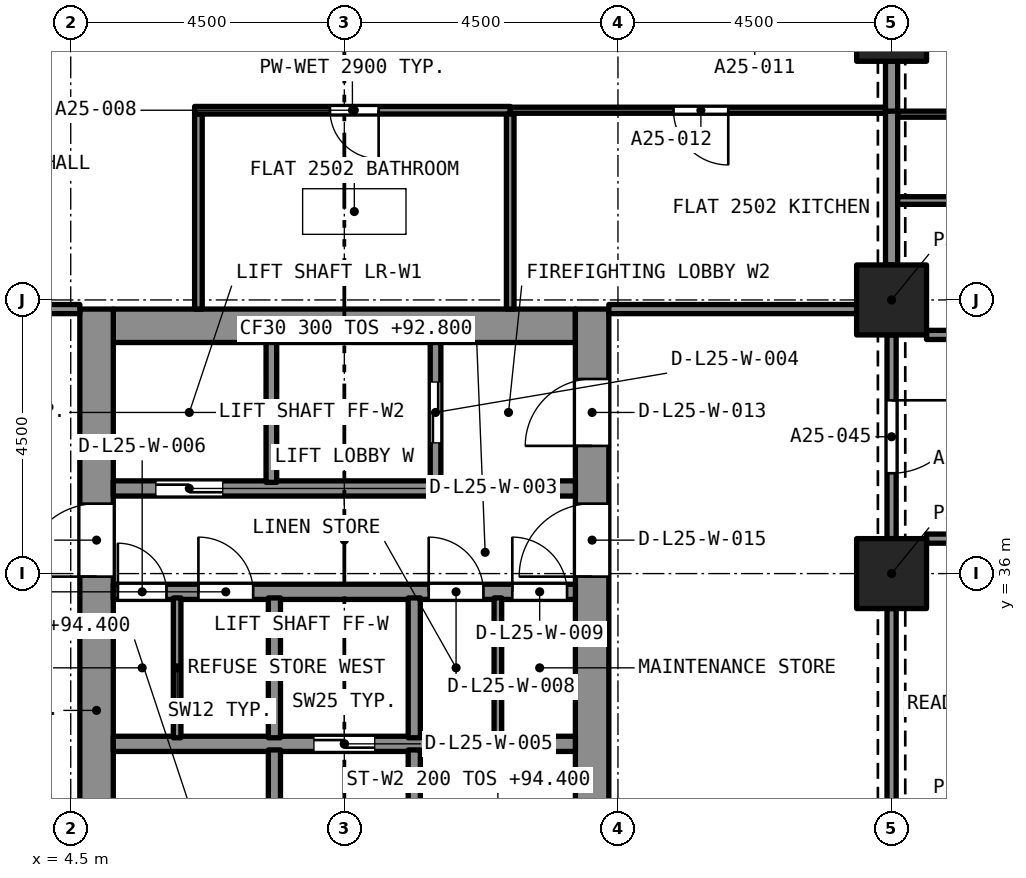
"""IFC4 building model, lengths in metres.
Left out: names, types, materials, properties, quantities, classifications, styles, units other than length and angle.
Written with IfcOpenShell. Run it as: python <this file> out.ifc"""

import sys

from ifc_helpers import new_model, si_unit, direction, frame, frame_2d, origin, origin_2d, place, context, subcontext, project, spatial, rectangle, extrude, element, fill, save


model = new_model("IFC4")
c1 = context("Model", 3, precision=1e-05, world=origin(), true_north=direction((0.0, 1.0)))
c2 = subcontext(c1, "Body", "Model", "MODEL_VIEW")
j1 = project(units=[si_unit("LENGTHUNIT", "METRE"), si_unit("PLANEANGLEUNIT", "RADIAN")], contexts=[c1])
p1 = place(None, origin())
s1 = spatial("IfcSite", under=j1, at=p1, CompositionType="ELEMENT")
p2 = place(p1, origin())
s2 = spatial("IfcBuilding", under=s1, at=p2, CompositionType="ELEMENT")
p3 = place(p2, frame((0.0, 0.0, 92.8)))
s3 = spatial("IfcBuildingStorey", under=s2, at=p3, CompositionType="ELEMENT", Elevation=92.8)
for number, where, z_axis, x_axis in (
    (1, (18.0, 36.0, 0.0), (0.0, 0.0, 1.0), (1.0, 0.0, 0.0)),
    (2, (18.0, 40.5, 0.0), (0.0, 0.0, 1.0), (1.0, 0.0, 0.0)),
    (3, (18.0, 45.0, 0.0), (0.0, 0.0, 1.0), (1.0, 0.0, 0.0)),
):
    element("IfcColumn", number, at=place(p3, frame(where, z_axis=z_axis, x_axis=x_axis)), inside=s3, PredefinedType="COLUMN", context=c2, shape_type="SweptSolid", body=[
        extrude(rectangle(XDim=1.15, YDim=1.15, at=origin_2d()), origin(), (0.0, 0.0, 1.0), 3.2),
    ])
p4 = place(p3, frame((5.2, 40.075, 0.0), z_axis=(0.0, 0.0, 1.0), x_axis=(1.0, 0.0, 0.0)))
e4 = element("IfcWall", 4, at=p4, inside=s3, PredefinedType="SOLIDWALL", context=c2, shape_type="SweptSolid", body=[
    extrude(rectangle(XDim=7.6, YDim=0.55, at=frame_2d((3.8, 0.0))), origin(), (0.0, 0.0, 1.0), 3.2),
])
p5 = place(p3, frame((4.925, 27.15, 0.0), z_axis=(0.0, 0.0, 1.0), x_axis=(0.0, 1.0, 0.0)))
e5 = element("IfcWall", 5, at=p5, inside=s3, PredefinedType="SOLIDWALL", context=c2, shape_type="SweptSolid", body=[
    extrude(rectangle(XDim=13.2, YDim=0.55, at=frame_2d((6.6, 0.0))), origin(), (0.0, 0.0, 1.0), 3.2),
])
p6 = place(p5, frame((8.8, 0.0, 0.0)))
e6 = element("IfcOpeningElement", 6, at=p6, cuts=e5, PredefinedType="OPENING", context=c2, shape_type="SweptSolid", body=[
    extrude(rectangle(XDim=1.2, YDim=2.1, at=frame_2d((0.6, 1.05))), frame((0.0, 0.285, 0.0), z_axis=(0.0, -1.0, 0.0), x_axis=(1.0, 0.0, 0.0)), (0.0, 0.0, 1.0), 0.57),
])
p7 = place(p3, frame((13.075, 27.15, 0.0), z_axis=(0.0, 0.0, 1.0), x_axis=(0.0, 1.0, 0.0)))
e7 = element("IfcWall", 7, at=p7, inside=s3, PredefinedType="SOLIDWALL", context=c2, shape_type="SweptSolid", body=[
    extrude(rectangle(XDim=13.2, YDim=0.55, at=frame_2d((6.6, 0.0))), origin(), (0.0, 0.0, 1.0), 3.2),
])
p8 = place(p7, frame((10.95, 0.0, 0.0)))
e8 = element("IfcOpeningElement", 8, at=p8, cuts=e7, PredefinedType="OPENING", context=c2, shape_type="SweptSolid", body=[
    extrude(rectangle(XDim=1.1, YDim=2.1, at=frame_2d((0.55, 1.05))), frame((0.0, 0.285, 0.0), z_axis=(0.0, -1.0, 0.0), x_axis=(1.0, 0.0, 0.0)), (0.0, 0.0, 1.0), 0.57),
])
p9 = place(p7, frame((8.8, 0.0, 0.0)))
e9 = element("IfcOpeningElement", 9, at=p9, cuts=e7, PredefinedType="OPENING", context=c2, shape_type="SweptSolid", body=[
    extrude(rectangle(XDim=1.2, YDim=2.1, at=frame_2d((0.6, 1.05))), frame((0.0, 0.285, 0.0), z_axis=(0.0, -1.0, 0.0), x_axis=(1.0, 0.0, 0.0)), (0.0, 0.0, 1.0), 0.57),
])
p10 = place(p3, frame((6.6, 40.35, 0.0), z_axis=(0.0, 0.0, 1.0), x_axis=(0.0, 1.0, 0.0)))
e10 = element("IfcWall", 10, at=p10, inside=s3, PredefinedType="PARTITIONING", context=c2, shape_type="SweptSolid", body=[
    extrude(rectangle(XDim=3.208, YDim=0.125, at=frame_2d((1.604, 0.0))), origin(), (0.0, 0.0, 1.0), 2.9),
])
p11 = place(p3, frame((11.728, 43.62, 0.0), z_axis=(0.0, 0.0, 1.0), x_axis=(-1.0, 0.0, 0.0)))
e11 = element("IfcWall", 11, at=p11, inside=s3, PredefinedType="PARTITIONING", context=c2, shape_type="SweptSolid", body=[
    extrude(rectangle(XDim=5.19, YDim=0.125, at=frame_2d((2.595, 0.0))), origin(), (0.0, 0.0, 1.0), 2.9),
])
p12 = place(p11, frame((2.164, 0.0, 0.0)))
e12 = element("IfcOpeningElement", 12, at=p12, cuts=e11, PredefinedType="OPENING", context=c2, shape_type="SweptSolid", body=[
    extrude(rectangle(XDim=0.8, YDim=2.1, at=frame_2d((0.4, 1.05))), frame((0.0, 0.073, 0.0), z_axis=(0.0, -1.0, 0.0), x_axis=(1.0, 0.0, 0.0)), (0.0, 0.0, 1.0), 0.145),
])
p13 = place(p3, frame((11.728, 40.35, 0.0), z_axis=(0.0, 0.0, 1.0), x_axis=(0.0, 1.0, 0.0)))
e13 = element("IfcWall", 13, at=p13, inside=s3, PredefinedType="PARTITIONING", context=c2, shape_type="SweptSolid", body=[
    extrude(rectangle(XDim=3.208, YDim=0.125, at=frame_2d((1.604, 0.0))), origin(), (0.0, 0.0, 1.0), 2.9),
])
p14 = place(p3, frame((17.9, 43.62, 0.0), z_axis=(0.0, 0.0, 1.0), x_axis=(-1.0, 0.0, 0.0)))
e14 = element("IfcWall", 14, at=p14, inside=s3, PredefinedType="PARTITIONING", context=c2, shape_type="SweptSolid", body=[
    extrude(rectangle(XDim=6.172, YDim=0.1, at=frame_2d((3.086, 0.0))), origin(), (0.0, 0.0, 1.0), 2.9),
])
p15 = place(p14, frame((2.586, 0.0, 0.0)))
e15 = element("IfcOpeningElement", 15, at=p15, cuts=e14, PredefinedType="OPENING", context=c2, shape_type="SweptSolid", body=[
    extrude(rectangle(XDim=0.9, YDim=2.1, at=frame_2d((0.45, 1.05))), frame((0.0, 0.06, 0.0), z_axis=(0.0, -1.0, 0.0), x_axis=(1.0, 0.0, 0.0)), (0.0, 0.0, 1.0), 0.12),
])
p16 = place(p3, frame((18.0, 43.57, 0.0), z_axis=(0.0, 0.0, 1.0), x_axis=(0.0, 1.0, 0.0)))
e16 = element("IfcWall", 16, at=p16, inside=s3, PredefinedType="PARTITIONING", context=c2, shape_type="SweptSolid", body=[
    extrude(rectangle(XDim=0.855, YDim=0.2, at=frame_2d((0.427, 0.0))), origin(), (0.0, 0.0, 1.0), 2.38),
])
p17 = place(p3, frame((0.575, 40.35, 0.0), z_axis=(0.0, 0.0, 1.0), x_axis=(1.0, 0.0, 0.0)))
e17 = element("IfcWall", 17, at=p17, inside=s3, PredefinedType="PARTITIONING", context=c2, shape_type="SweptSolid", body=[
    extrude(rectangle(XDim=4.075, YDim=0.15, at=frame_2d((2.038, 0.0))), origin(), (0.0, 0.0, 1.0), 2.9),
])
p18 = place(p17, frame((1.175, 0.0, 0.0)))
e18 = element("IfcOpeningElement", 18, at=p18, cuts=e17, PredefinedType="OPENING", context=c2, shape_type="SweptSolid", body=[
    extrude(rectangle(XDim=1.0, YDim=2.1, at=frame_2d((0.5, 1.05))), frame((0.0, 0.085, 0.0), z_axis=(0.0, -1.0, 0.0), x_axis=(1.0, 0.0, 0.0)), (0.0, 0.0, 1.0), 0.17),
])
p19 = place(p3, frame((18.0, 41.075, 0.0), z_axis=(0.0, 0.0, 1.0), x_axis=(0.0, 1.0, 0.0)))
e19 = element("IfcWall", 19, at=p19, inside=s3, PredefinedType="PARTITIONING", context=c2, shape_type="SweptSolid", body=[
    extrude(rectangle(XDim=2.53, YDim=0.2, at=frame_2d((1.265, 0.0))), origin(), (0.0, 0.0, 1.0), 2.38),
])
p20 = place(p3, frame((13.35, 40.35, 0.0), z_axis=(0.0, 0.0, 1.0), x_axis=(1.0, 0.0, 0.0)))
e20 = element("IfcWall", 20, at=p20, inside=s3, PredefinedType="PARTITIONING", context=c2, shape_type="SweptSolid", body=[
    extrude(rectangle(XDim=4.075, YDim=0.15, at=frame_2d((2.038, 0.0))), origin(), (0.0, 0.0, 1.0), 2.9),
])
p21 = place(p3, frame((20.762, 42.135, 0.0), z_axis=(0.0, 0.0, 1.0), x_axis=(-1.0, 0.0, 0.0)))
e21 = element("IfcWall", 21, at=p21, inside=s3, PredefinedType="PARTITIONING", context=c2, shape_type="SweptSolid", body=[
    extrude(rectangle(XDim=2.662, YDim=0.125, at=frame_2d((1.331, 0.0))), origin(), (0.0, 0.0, 1.0), 2.75),
])
p22 = place(p21, frame((1.012, 0.0, 0.0)))
e22 = element("IfcOpeningElement", 22, at=p22, cuts=e21, PredefinedType="OPENING", context=c2, shape_type="SweptSolid", body=[
    extrude(rectangle(XDim=0.8, YDim=2.1, at=frame_2d((0.4, 1.05))), frame((0.0, 0.073, 0.0), z_axis=(0.0, -1.0, 0.0), x_axis=(1.0, 0.0, 0.0)), (0.0, 0.0, 1.0), 0.145),
])
p23 = place(p3, frame((18.575, 39.925, 0.0), z_axis=(0.0, 0.0, 1.0), x_axis=(1.0, 0.0, 0.0)))
e23 = element("IfcWall", 23, at=p23, inside=s3, PredefinedType="PARTITIONING", context=c2, shape_type="SweptSolid", body=[
    extrude(rectangle(XDim=2.125, YDim=0.15, at=frame_2d((1.062, 0.0))), origin(), (0.0, 0.0, 1.0), 2.75),
])
p24 = place(p3, frame((18.1, 43.555, 0.0), z_axis=(0.0, 0.0, 1.0), x_axis=(1.0, 0.0, 0.0)))
e24 = element("IfcWall", 24, at=p24, inside=s3, PredefinedType="PARTITIONING", context=c2, shape_type="SweptSolid", body=[
    extrude(rectangle(XDim=4.4, YDim=0.1, at=frame_2d((2.2, 0.0))), origin(), (0.0, 0.0, 1.0), 2.75),
])
p25 = place(p24, frame((1.65, 0.0, 0.0)))
e25 = element("IfcOpeningElement", 25, at=p25, cuts=e24, PredefinedType="OPENING", context=c2, shape_type="SweptSolid", body=[
    extrude(rectangle(XDim=1.0, YDim=2.1, at=frame_2d((0.5, 1.05))), frame((0.0, 0.06, 0.0), z_axis=(0.0, -1.0, 0.0), x_axis=(1.0, 0.0, 0.0)), (0.0, 0.0, 1.0), 0.12),
])
p26 = place(p3, frame((22.5, 36.575, 0.0), z_axis=(0.0, 0.0, 1.0), x_axis=(-1.0, 0.0, 0.0)))
e26 = element("IfcWall", 26, at=p26, inside=s3, PredefinedType="PARTITIONING", context=c2, shape_type="SweptSolid", body=[
    extrude(rectangle(XDim=3.925, YDim=0.15, at=frame_2d((1.962, 0.0))), origin(), (0.0, 0.0, 1.0), 2.75),
])
p27 = place(p26, frame((1.75, 0.0, 0.0)))
e27 = element("IfcOpeningElement", 27, at=p27, cuts=e26, PredefinedType="OPENING", context=c2, shape_type="SweptSolid", body=[
    extrude(rectangle(XDim=1.0, YDim=2.1, at=frame_2d((0.5, 1.05))), frame((0.0, 0.085, 0.0), z_axis=(0.0, -1.0, 0.0), x_axis=(1.0, 0.0, 0.0)), (0.0, 0.0, 1.0), 0.17),
])
p28 = place(p3, frame((18.0, 39.925, 0.0), z_axis=(0.0, 0.0, 1.0), x_axis=(0.0, -1.0, 0.0)))
e28 = element("IfcWall", 28, at=p28, inside=s3, PredefinedType="PARTITIONING", context=c2, shape_type="SweptSolid", body=[
    extrude(rectangle(XDim=3.35, YDim=0.15, at=frame_2d((1.675, 0.0))), origin(), (0.0, 0.0, 1.0), 2.38),
])
p29 = place(p28, frame((1.075, 0.0, 0.0)))
e29 = element("IfcOpeningElement", 29, at=p29, cuts=e28, PredefinedType="OPENING", context=c2, shape_type="SweptSolid", body=[
    extrude(rectangle(XDim=1.2, YDim=2.1, at=frame_2d((0.6, 1.05))), frame((0.0, 0.085, 0.0), z_axis=(0.0, -1.0, 0.0), x_axis=(1.0, 0.0, 0.0)), (0.0, 0.0, 1.0), 0.17),
])
p30 = place(p3, frame((18.0, 32.075, 0.0), z_axis=(0.0, 0.0, 1.0), x_axis=(0.0, 1.0, 0.0)))
e30 = element("IfcWall", 30, at=p30, inside=s3, PredefinedType="PARTITIONING", context=c2, shape_type="SweptSolid", body=[
    extrude(rectangle(XDim=3.35, YDim=0.15, at=frame_2d((1.675, 0.0))), origin(), (0.0, 0.0, 1.0), 2.38),
])
p31 = place(p3, frame((5.2, 33.2, 0.0), z_axis=(0.0, 0.0, 1.0), x_axis=(1.0, 0.0, 0.0)))
e31 = element("IfcWall", 31, at=p31, inside=s3, PredefinedType="SOLIDWALL", context=c2, shape_type="SweptSolid", body=[
    extrude(rectangle(XDim=7.6, YDim=0.25, at=frame_2d((3.8, 0.0))), origin(), (0.0, 0.0, 1.0), 2.9),
])
p32 = place(p31, frame((3.3, 0.0, 0.0)))
e32 = element("IfcOpeningElement", 32, at=p32, cuts=e31, PredefinedType="OPENING", context=c2, shape_type="SweptSolid", body=[
    extrude(rectangle(XDim=1.0, YDim=2.1, at=frame_2d((0.5, 1.05))), frame((0.0, 0.135, 0.0), z_axis=(0.0, -1.0, 0.0), x_axis=(1.0, 0.0, 0.0)), (0.0, 0.0, 1.0), 0.27),
])
p33 = place(p3, frame((5.2, 35.7, 0.0), z_axis=(0.0, 0.0, 1.0), x_axis=(1.0, 0.0, 0.0)))
e33 = element("IfcWall", 33, at=p33, inside=s3, PredefinedType="SOLIDWALL", context=c2, shape_type="SweptSolid", body=[
    extrude(rectangle(XDim=7.6, YDim=0.25, at=frame_2d((3.8, 0.0))), origin(), (0.0, 0.0, 1.0), 2.9),
])
p34 = place(p33, frame((0.075, 0.0, 0.0)))
e34 = element("IfcOpeningElement", 34, at=p34, cuts=e33, PredefinedType="OPENING", context=c2, shape_type="SweptSolid", body=[
    extrude(rectangle(XDim=0.8, YDim=2.1, at=frame_2d((0.4, 1.05))), frame((0.0, 0.135, 0.0), z_axis=(0.0, -1.0, 0.0), x_axis=(1.0, 0.0, 0.0)), (0.0, 0.0, 1.0), 0.27),
])
p35 = place(p33, frame((1.4, 0.0, 0.0)))
e35 = element("IfcOpeningElement", 35, at=p35, cuts=e33, PredefinedType="OPENING", context=c2, shape_type="SweptSolid", body=[
    extrude(rectangle(XDim=0.9, YDim=2.1, at=frame_2d((0.45, 1.05))), frame((0.0, 0.135, 0.0), z_axis=(0.0, -1.0, 0.0), x_axis=(1.0, 0.0, 0.0)), (0.0, 0.0, 1.0), 0.27),
])
p36 = place(p33, frame((5.188, 0.0, 0.0)))
e36 = element("IfcOpeningElement", 36, at=p36, cuts=e33, PredefinedType="OPENING", context=c2, shape_type="SweptSolid", body=[
    extrude(rectangle(XDim=0.9, YDim=2.1, at=frame_2d((0.45, 1.05))), frame((0.0, 0.135, 0.0), z_axis=(0.0, -1.0, 0.0), x_axis=(1.0, 0.0, 0.0)), (0.0, 0.0, 1.0), 0.27),
])
p37 = place(p33, frame((6.562, 0.0, 0.0)))
e37 = element("IfcOpeningElement", 37, at=p37, cuts=e33, PredefinedType="OPENING", context=c2, shape_type="SweptSolid", body=[
    extrude(rectangle(XDim=0.9, YDim=2.1, at=frame_2d((0.45, 1.05))), frame((0.0, 0.135, 0.0), z_axis=(0.0, -1.0, 0.0), x_axis=(1.0, 0.0, 0.0)), (0.0, 0.0, 1.0), 0.27),
])
p38 = place(p3, frame((5.2, 37.4, 0.0), z_axis=(0.0, 0.0, 1.0), x_axis=(1.0, 0.0, 0.0)))
e38 = element("IfcWall", 38, at=p38, inside=s3, PredefinedType="SOLIDWALL", context=c2, shape_type="SweptSolid", body=[
    extrude(rectangle(XDim=7.6, YDim=0.25, at=frame_2d((3.8, 0.0))), origin(), (0.0, 0.0, 1.0), 2.9),
])
p39 = place(p38, frame((0.7, 0.0, 0.0)))
e39 = element("IfcOpeningElement", 39, at=p39, cuts=e38, PredefinedType="OPENING", context=c2, shape_type="SweptSolid", body=[
    extrude(rectangle(XDim=1.1, YDim=2.4, at=frame_2d((0.55, 1.2))), frame((0.0, 0.135, 0.0), z_axis=(0.0, -1.0, 0.0), x_axis=(1.0, 0.0, 0.0)), (0.0, 0.0, 1.0), 0.27),
])
p40 = place(p3, frame((7.85, 27.7, 0.0), z_axis=(0.0, 0.0, 1.0), x_axis=(0.0, 1.0, 0.0)))
e40 = element("IfcWall", 40, at=p40, inside=s3, PredefinedType="SOLIDWALL", context=c2, shape_type="SweptSolid", body=[
    extrude(rectangle(XDim=5.4, YDim=0.2, at=frame_2d((2.7, 0.0))), origin(), (0.0, 0.0, 1.0), 2.9),
])
p41 = place(p40, frame((0.2, 0.0, 0.0)))
e41 = element("IfcOpeningElement", 41, at=p41, cuts=e40, PredefinedType="OPENING", context=c2, shape_type="SweptSolid", body=[
    extrude(rectangle(XDim=0.9, YDim=2.1, at=frame_2d((0.45, 1.05))), frame((0.0, 0.11, 0.0), z_axis=(0.0, -1.0, 0.0), x_axis=(1.0, 0.0, 0.0)), (0.0, 0.0, 1.0), 0.22),
])
p42 = place(p3, frame((10.15, 27.7, 0.0), z_axis=(0.0, 0.0, 1.0), x_axis=(0.0, 1.0, 0.0)))
e42 = element("IfcWall", 42, at=p42, inside=s3, PredefinedType="SOLIDWALL", context=c2, shape_type="SweptSolid", body=[
    extrude(rectangle(XDim=5.4, YDim=0.2, at=frame_2d((2.7, 0.0))), origin(), (0.0, 0.0, 1.0), 2.9),
])
p43 = place(p42, frame((0.2, 0.0, 0.0)))
e43 = element("IfcOpeningElement", 43, at=p43, cuts=e42, PredefinedType="OPENING", context=c2, shape_type="SweptSolid", body=[
    extrude(rectangle(XDim=0.9, YDim=2.1, at=frame_2d((0.45, 1.05))), frame((0.0, 0.11, 0.0), z_axis=(0.0, -1.0, 0.0), x_axis=(1.0, 0.0, 0.0)), (0.0, 0.0, 1.0), 0.22),
])
for number, where, z_axis, x_axis in (
    (44, (7.85, 33.3, 0.0), (0.0, 0.0, 1.0), (0.0, 1.0, 0.0)),
    (45, (10.15, 33.3, 0.0), (0.0, 0.0, 1.0), (0.0, 1.0, 0.0)),
):
    element("IfcWall", number, at=place(p3, frame(where, z_axis=z_axis, x_axis=x_axis)), inside=s3, PredefinedType="SOLIDWALL", context=c2, shape_type="SweptSolid", body=[
        extrude(rectangle(XDim=2.3, YDim=0.2, at=frame_2d((1.15, 0.0))), origin(), (0.0, 0.0, 1.0), 2.9),
    ])
p44 = place(p3, frame((7.8, 37.5, 0.0), z_axis=(0.0, 0.0, 1.0), x_axis=(0.0, 1.0, 0.0)))
e46 = element("IfcWall", 46, at=p44, inside=s3, PredefinedType="SOLIDWALL", context=c2, shape_type="SweptSolid", body=[
    extrude(rectangle(XDim=2.3, YDim=0.175, at=frame_2d((1.15, 0.0))), origin(), (0.0, 0.0, 1.0), 2.9),
])
p45 = place(p3, frame((10.5, 37.5, 0.0), z_axis=(0.0, 0.0, 1.0), x_axis=(0.0, 1.0, 0.0)))
e47 = element("IfcWall", 47, at=p45, inside=s3, PredefinedType="SOLIDWALL", context=c2, shape_type="SweptSolid", body=[
    extrude(rectangle(XDim=2.3, YDim=0.175, at=frame_2d((1.15, 0.0))), origin(), (0.0, 0.0, 1.0), 2.9),
])
p46 = place(p45, frame((0.65, 0.0, 0.0)))
e48 = element("IfcOpeningElement", 48, at=p46, cuts=e47, PredefinedType="OPENING", context=c2, shape_type="SweptSolid", body=[
    extrude(rectangle(XDim=1.0, YDim=2.1, at=frame_2d((0.5, 1.05))), frame((0.0, 0.097, 0.0), z_axis=(0.0, -1.0, 0.0), x_axis=(1.0, 0.0, 0.0)), (0.0, 0.0, 1.0), 0.195),
])
for number, where, z_axis, x_axis in (
    (49, (6.25, 33.3, 0.0), (0.0, 0.0, 1.0), (0.0, 1.0, 0.0)),
    (50, (11.525, 33.3, 0.0), (0.0, 0.0, 1.0), (0.0, 1.0, 0.0)),
):
    element("IfcWall", number, at=place(p3, frame(where, z_axis=z_axis, x_axis=x_axis)), inside=s3, PredefinedType="PARTITIONING", context=c2, shape_type="SweptSolid", body=[
        extrude(rectangle(XDim=2.3, YDim=0.125, at=frame_2d((1.15, 0.0))), origin(), (0.0, 0.0, 1.0), 2.9),
    ])
p47 = place(p12, origin())
e51 = element("IfcDoor", 51, at=p47, inside=s3, OperationType="SINGLE_SWING_LEFT", PredefinedType="DOOR", context=c2, shape_type="SweptSolid", body=[
    extrude(rectangle(XDim=0.8, YDim=2.1, at=frame_2d((0.4, 1.05))), frame((0.0, 0.025, 0.0), z_axis=(0.0, -1.0, 0.0), x_axis=(1.0, 0.0, 0.0)), (0.0, 0.0, 1.0), 0.05),
])
fill(e12, e51)
p48 = place(p15, origin())
e52 = element("IfcDoor", 52, at=p48, inside=s3, OperationType="SINGLE_SWING_LEFT", PredefinedType="DOOR", context=c2, shape_type="SweptSolid", body=[
    extrude(rectangle(XDim=0.9, YDim=2.1, at=frame_2d((0.45, 1.05))), frame((0.0, 0.025, 0.0), z_axis=(0.0, -1.0, 0.0), x_axis=(1.0, 0.0, 0.0)), (0.0, 0.0, 1.0), 0.05),
])
fill(e15, e52)
p49 = place(p29, origin())
e53 = element("IfcDoor", 53, at=p49, inside=s3, OperationType="SINGLE_SWING_LEFT", PredefinedType="DOOR", context=c2, shape_type="SweptSolid", body=[
    extrude(rectangle(XDim=1.2, YDim=2.1, at=frame_2d((0.6, 1.05))), frame((0.0, 0.025, 0.0), z_axis=(0.0, -1.0, 0.0), x_axis=(1.0, 0.0, 0.0)), (0.0, 0.0, 1.0), 0.05),
])
fill(e29, e53)
p50 = place(p39, origin())
e54 = element("IfcDoor", 54, at=p50, inside=s3, OperationType="SLIDING_TO_LEFT", PredefinedType="DOOR", context=c2, shape_type="SweptSolid", body=[
    extrude(rectangle(XDim=1.1, YDim=2.4, at=frame_2d((0.55, 1.2))), frame((0.0, 0.025, 0.0), z_axis=(0.0, -1.0, 0.0), x_axis=(1.0, 0.0, 0.0)), (0.0, 0.0, 1.0), 0.05),
])
fill(e39, e54)
p51 = place(p46, origin())
e55 = element("IfcDoor", 55, at=p51, inside=s3, OperationType="SLIDING_TO_LEFT", PredefinedType="DOOR", context=c2, shape_type="SweptSolid", body=[
    extrude(rectangle(XDim=1.0, YDim=2.1, at=frame_2d((0.5, 1.05))), frame((0.0, 0.025, 0.0), z_axis=(0.0, -1.0, 0.0), x_axis=(1.0, 0.0, 0.0)), (0.0, 0.0, 1.0), 0.05),
])
fill(e48, e55)
p52 = place(p32, origin())
e56 = element("IfcDoor", 56, at=p52, inside=s3, OperationType="SLIDING_TO_LEFT", PredefinedType="DOOR", context=c2, shape_type="SweptSolid", body=[
    extrude(rectangle(XDim=1.0, YDim=2.1, at=frame_2d((0.5, 1.05))), frame((0.0, 0.025, 0.0), z_axis=(0.0, -1.0, 0.0), x_axis=(1.0, 0.0, 0.0)), (0.0, 0.0, 1.0), 0.05),
])
fill(e32, e56)
p53 = place(p34, origin())
e57 = element("IfcDoor", 57, at=p53, inside=s3, OperationType="SINGLE_SWING_LEFT", PredefinedType="DOOR", context=c2, shape_type="SweptSolid", body=[
    extrude(rectangle(XDim=0.8, YDim=2.1, at=frame_2d((0.4, 1.05))), frame((0.0, 0.025, 0.0), z_axis=(0.0, -1.0, 0.0), x_axis=(1.0, 0.0, 0.0)), (0.0, 0.0, 1.0), 0.05),
])
fill(e34, e57)
p54 = place(p35, origin())
e58 = element("IfcDoor", 58, at=p54, inside=s3, OperationType="SINGLE_SWING_LEFT", PredefinedType="DOOR", context=c2, shape_type="SweptSolid", body=[
    extrude(rectangle(XDim=0.9, YDim=2.1, at=frame_2d((0.45, 1.05))), frame((0.0, 0.025, 0.0), z_axis=(0.0, -1.0, 0.0), x_axis=(1.0, 0.0, 0.0)), (0.0, 0.0, 1.0), 0.05),
])
fill(e35, e58)
p55 = place(p36, origin())
e59 = element("IfcDoor", 59, at=p55, inside=s3, OperationType="SINGLE_SWING_LEFT", PredefinedType="DOOR", context=c2, shape_type="SweptSolid", body=[
    extrude(rectangle(XDim=0.9, YDim=2.1, at=frame_2d((0.45, 1.05))), frame((0.0, 0.025, 0.0), z_axis=(0.0, -1.0, 0.0), x_axis=(1.0, 0.0, 0.0)), (0.0, 0.0, 1.0), 0.05),
])
fill(e36, e59)
p56 = place(p37, origin())
e60 = element("IfcDoor", 60, at=p56, inside=s3, OperationType="SINGLE_SWING_LEFT", PredefinedType="DOOR", context=c2, shape_type="SweptSolid", body=[
    extrude(rectangle(XDim=0.9, YDim=2.1, at=frame_2d((0.45, 1.05))), frame((0.0, 0.025, 0.0), z_axis=(0.0, -1.0, 0.0), x_axis=(1.0, 0.0, 0.0)), (0.0, 0.0, 1.0), 0.05),
])
fill(e37, e60)
p57 = place(p8, origin())
e61 = element("IfcDoor", 61, at=p57, inside=s3, OperationType="SINGLE_SWING_LEFT", PredefinedType="DOOR", context=c2, shape_type="SweptSolid", body=[
    extrude(rectangle(XDim=1.1, YDim=2.1, at=frame_2d((0.55, 1.05))), frame((0.0, 0.025, 0.0), z_axis=(0.0, -1.0, 0.0), x_axis=(1.0, 0.0, 0.0)), (0.0, 0.0, 1.0), 0.05),
])
fill(e8, e61)
p58 = place(p6, origin())
e62 = element("IfcDoor", 62, at=p58, inside=s3, OperationType="SINGLE_SWING_LEFT", PredefinedType="DOOR", context=c2, shape_type="SweptSolid", body=[
    extrude(rectangle(XDim=1.2, YDim=2.1, at=frame_2d((0.6, 1.05))), frame((0.0, 0.025, 0.0), z_axis=(0.0, -1.0, 0.0), x_axis=(1.0, 0.0, 0.0)), (0.0, 0.0, 1.0), 0.05),
])
fill(e6, e62)
p59 = place(p9, origin())
e63 = element("IfcDoor", 63, at=p59, inside=s3, OperationType="SINGLE_SWING_LEFT", PredefinedType="DOOR", context=c2, shape_type="SweptSolid", body=[
    extrude(rectangle(XDim=1.2, YDim=2.1, at=frame_2d((0.6, 1.05))), frame((0.0, 0.025, 0.0), z_axis=(0.0, -1.0, 0.0), x_axis=(1.0, 0.0, 0.0)), (0.0, 0.0, 1.0), 0.05),
])
fill(e9, e63)
save(model, sys.argv[1])
